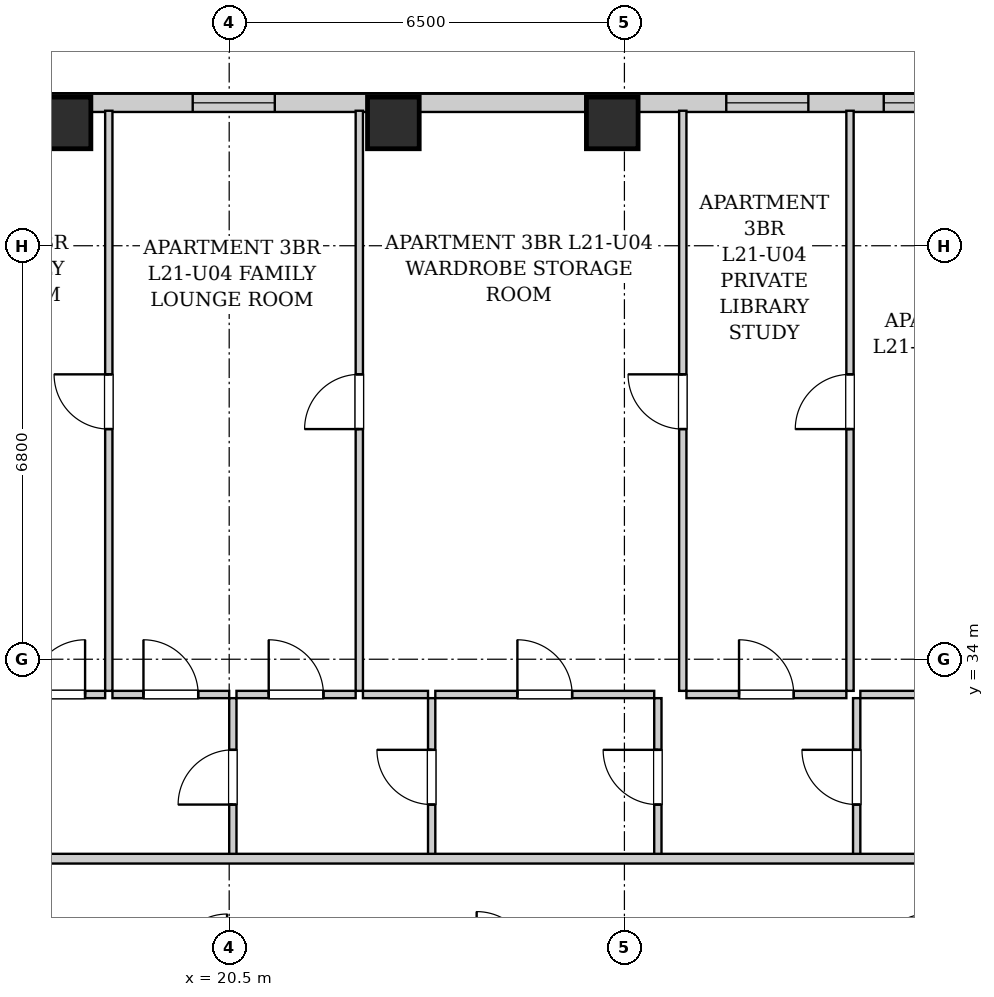
"""IFC4 building model, lengths in metres.
Left out: names, types, materials, properties, quantities, classifications, styles, units other than length and angle.
Written with IfcOpenShell. Run it as: python <this file> out.ifc"""

import sys

from ifc_helpers import new_model, si_unit, direction, frame, frame_2d, origin, origin_2d, place, context, subcontext, project, spatial, rectangle, extrude, element, fill, save


model = new_model("IFC4")
c1 = context("Model", 3, precision=1e-05, world=origin(), true_north=direction((0.0, 1.0)))
c2 = subcontext(c1, "Body", "Model", "MODEL_VIEW")
j1 = project(units=[si_unit("LENGTHUNIT", "METRE"), si_unit("PLANEANGLEUNIT", "RADIAN")], contexts=[c1])
p1 = place(None, origin())
s1 = spatial("IfcSite", under=j1, at=p1, CompositionType="ELEMENT")
p2 = place(p1, origin())
s2 = spatial("IfcBuilding", under=s1, at=p2, CompositionType="ELEMENT")
p3 = place(p2, frame((0.0, 0.0, 78.3)))
s3 = spatial("IfcBuildingStorey", under=s2, at=p3, CompositionType="ELEMENT", Elevation=78.3)
for number, where, z_axis, x_axis in (
    (1, (17.8, 42.82, 0.0), (0.0, 0.0, 1.0), (1.0, 0.0, 0.0)),
    (2, (23.2, 42.82, 0.0), (0.0, 0.0, 1.0), (1.0, 0.0, 0.0)),
    (3, (26.8, 42.82, 0.0), (0.0, 0.0, 1.0), (1.0, 0.0, 0.0)),
):
    element("IfcColumn", number, at=place(p3, frame(where, z_axis=z_axis, x_axis=x_axis)), inside=s3, PredefinedType="COLUMN", context=c2, shape_type="SweptSolid", body=[
        extrude(rectangle(XDim=0.85, YDim=0.85, at=origin_2d()), origin(), (0.0, 0.0, 1.0), 3.2),
    ])
p4 = place(p3, frame((10.0, 43.15, 0.0), z_axis=(0.0, 0.0, 1.0), x_axis=(1.0, 0.0, 0.0)))
e4 = element("IfcWall", 4, at=p4, inside=s3, PredefinedType="SOLIDWALL", context=c2, shape_type="SweptSolid", body=[
    extrude(rectangle(XDim=23.7, YDim=0.3, at=frame_2d((11.85, 0.0))), origin(), (0.0, 0.0, 1.0), 2.94),
])
p5 = place(p4, frame((5.625, 0.0, 0.55)))
e5 = element("IfcOpeningElement", 5, at=p5, cuts=e4, PredefinedType="OPENING", context=c2, shape_type="SweptSolid", body=[
    extrude(rectangle(XDim=1.35, YDim=1.2, at=frame_2d((0.675, 0.6))), frame((0.0, 0.16, 0.0), z_axis=(0.0, -1.0, 0.0), x_axis=(1.0, 0.0, 0.0)), (0.0, 0.0, 1.0), 0.32),
])
p6 = place(p4, frame((9.9, 0.0, 0.55)))
e6 = element("IfcOpeningElement", 6, at=p6, cuts=e4, PredefinedType="OPENING", context=c2, shape_type="SweptSolid", body=[
    extrude(rectangle(XDim=1.35, YDim=1.2, at=frame_2d((0.675, 0.6))), frame((0.0, 0.16, 0.0), z_axis=(0.0, -1.0, 0.0), x_axis=(1.0, 0.0, 0.0)), (0.0, 0.0, 1.0), 0.32),
])
p7 = place(p4, frame((18.675, 0.0, 0.55)))
e7 = element("IfcOpeningElement", 7, at=p7, cuts=e4, PredefinedType="OPENING", context=c2, shape_type="SweptSolid", body=[
    extrude(rectangle(XDim=1.35, YDim=1.2, at=frame_2d((0.675, 0.6))), frame((0.0, 0.16, 0.0), z_axis=(0.0, -1.0, 0.0), x_axis=(1.0, 0.0, 0.0)), (0.0, 0.0, 1.0), 0.32),
])
p8 = place(p4, frame((21.265, 0.0, 0.55)))
e8 = element("IfcOpeningElement", 8, at=p8, cuts=e4, PredefinedType="OPENING", context=c2, shape_type="SweptSolid", body=[
    extrude(rectangle(XDim=1.35, YDim=1.2, at=frame_2d((0.675, 0.6))), frame((0.0, 0.16, 0.0), z_axis=(0.0, -1.0, 0.0), x_axis=(1.0, 0.0, 0.0)), (0.0, 0.0, 1.0), 0.32),
])
p9 = place(p3, frame((20.56, 30.76, 0.0), z_axis=(0.0, 0.0, 1.0), x_axis=(0.0, 1.0, 0.0)))
e9 = element("IfcWall", 9, at=p9, inside=s3, PredefinedType="PARTITIONING", context=c2, shape_type="SweptSolid", body=[
    extrude(rectangle(XDim=2.6, YDim=0.12, at=frame_2d((1.3, 0.0))), origin(), (0.0, 0.0, 1.0), 2.94),
])
p10 = place(p9, frame((0.85, 0.0, 0.0)))
e10 = element("IfcOpeningElement", 10, at=p10, cuts=e9, PredefinedType="OPENING", context=c2, shape_type="SweptSolid", body=[
    extrude(rectangle(XDim=0.9, YDim=2.05, at=frame_2d((0.45, 1.025))), frame((0.0, 0.07, 0.0), z_axis=(0.0, -1.0, 0.0), x_axis=(1.0, 0.0, 0.0)), (0.0, 0.0, 1.0), 0.14),
])
p11 = place(p3, frame((16.9, 33.42, 0.0), z_axis=(0.0, 0.0, 1.0), x_axis=(1.0, 0.0, 0.0)))
e11 = element("IfcWall", 11, at=p11, inside=s3, PredefinedType="PARTITIONING", context=c2, shape_type="SweptSolid", body=[
    extrude(rectangle(XDim=1.56, YDim=0.12, at=frame_2d((0.78, 0.0))), origin(), (0.0, 0.0, 1.0), 2.94),
])
p12 = place(p11, frame((0.33, 0.0, 0.0)))
e12 = element("IfcOpeningElement", 12, at=p12, cuts=e11, PredefinedType="OPENING", context=c2, shape_type="SweptSolid", body=[
    extrude(rectangle(XDim=0.9, YDim=2.05, at=frame_2d((0.45, 1.025))), frame((0.0, 0.07, 0.0), z_axis=(0.0, -1.0, 0.0), x_axis=(1.0, 0.0, 0.0)), (0.0, 0.0, 1.0), 0.14),
])
p13 = place(p3, frame((18.58, 33.42, 0.0), z_axis=(0.0, 0.0, 1.0), x_axis=(1.0, 0.0, 0.0)))
e13 = element("IfcWall", 13, at=p13, inside=s3, PredefinedType="PARTITIONING", context=c2, shape_type="SweptSolid", body=[
    extrude(rectangle(XDim=1.92, YDim=0.12, at=frame_2d((0.96, 0.0))), origin(), (0.0, 0.0, 1.0), 2.94),
])
p14 = place(p13, frame((0.51, 0.0, 0.0)))
e14 = element("IfcOpeningElement", 14, at=p14, cuts=e13, PredefinedType="OPENING", context=c2, shape_type="SweptSolid", body=[
    extrude(rectangle(XDim=0.9, YDim=2.05, at=frame_2d((0.45, 1.025))), frame((0.0, 0.07, 0.0), z_axis=(0.0, -1.0, 0.0), x_axis=(1.0, 0.0, 0.0)), (0.0, 0.0, 1.0), 0.14),
])
p15 = place(p3, frame((23.83, 30.76, 0.0), z_axis=(0.0, 0.0, 1.0), x_axis=(0.0, 1.0, 0.0)))
e15 = element("IfcWall", 15, at=p15, inside=s3, PredefinedType="PARTITIONING", context=c2, shape_type="SweptSolid", body=[
    extrude(rectangle(XDim=2.6, YDim=0.12, at=frame_2d((1.3, 0.0))), origin(), (0.0, 0.0, 1.0), 2.94),
])
p16 = place(p15, frame((0.85, 0.0, 0.0)))
e16 = element("IfcOpeningElement", 16, at=p16, cuts=e15, PredefinedType="OPENING", context=c2, shape_type="SweptSolid", body=[
    extrude(rectangle(XDim=0.9, YDim=2.05, at=frame_2d((0.45, 1.025))), frame((0.0, 0.07, 0.0), z_axis=(0.0, -1.0, 0.0), x_axis=(1.0, 0.0, 0.0)), (0.0, 0.0, 1.0), 0.14),
])
p17 = place(p3, frame((20.62, 33.42, 0.0), z_axis=(0.0, 0.0, 1.0), x_axis=(1.0, 0.0, 0.0)))
e17 = element("IfcWall", 17, at=p17, inside=s3, PredefinedType="PARTITIONING", context=c2, shape_type="SweptSolid", body=[
    extrude(rectangle(XDim=1.96, YDim=0.12, at=frame_2d((0.98, 0.0))), origin(), (0.0, 0.0, 1.0), 2.94),
])
p18 = place(p17, frame((0.53, 0.0, 0.0)))
e18 = element("IfcOpeningElement", 18, at=p18, cuts=e17, PredefinedType="OPENING", context=c2, shape_type="SweptSolid", body=[
    extrude(rectangle(XDim=0.9, YDim=2.05, at=frame_2d((0.45, 1.025))), frame((0.0, 0.07, 0.0), z_axis=(0.0, -1.0, 0.0), x_axis=(1.0, 0.0, 0.0)), (0.0, 0.0, 1.0), 0.14),
])
p19 = place(p3, frame((22.7, 33.42, 0.0), z_axis=(0.0, 0.0, 1.0), x_axis=(1.0, 0.0, 0.0)))
e19 = element("IfcWall", 19, at=p19, inside=s3, PredefinedType="PARTITIONING", context=c2, shape_type="SweptSolid", body=[
    extrude(rectangle(XDim=1.07, YDim=0.12, at=frame_2d((0.535, 0.0))), origin(), (0.0, 0.0, 1.0), 2.94),
])
p20 = place(p3, frame((27.55, 30.76, 0.0), z_axis=(0.0, 0.0, 1.0), x_axis=(0.0, 1.0, 0.0)))
e20 = element("IfcWall", 20, at=p20, inside=s3, PredefinedType="PARTITIONING", context=c2, shape_type="SweptSolid", body=[
    extrude(rectangle(XDim=2.6, YDim=0.12, at=frame_2d((1.3, 0.0))), origin(), (0.0, 0.0, 1.0), 2.94),
])
p21 = place(p20, frame((0.85, 0.0, 0.0)))
e21 = element("IfcOpeningElement", 21, at=p21, cuts=e20, PredefinedType="OPENING", context=c2, shape_type="SweptSolid", body=[
    extrude(rectangle(XDim=0.9, YDim=2.05, at=frame_2d((0.45, 1.025))), frame((0.0, 0.07, 0.0), z_axis=(0.0, -1.0, 0.0), x_axis=(1.0, 0.0, 0.0)), (0.0, 0.0, 1.0), 0.14),
])
p22 = place(p3, frame((23.89, 33.42, 0.0), z_axis=(0.0, 0.0, 1.0), x_axis=(1.0, 0.0, 0.0)))
e22 = element("IfcWall", 22, at=p22, inside=s3, PredefinedType="PARTITIONING", context=c2, shape_type="SweptSolid", body=[
    extrude(rectangle(XDim=3.6, YDim=0.12, at=frame_2d((1.8, 0.0))), origin(), (0.0, 0.0, 1.0), 2.94),
])
p23 = place(p22, frame((1.35, 0.0, 0.0)))
e23 = element("IfcOpeningElement", 23, at=p23, cuts=e22, PredefinedType="OPENING", context=c2, shape_type="SweptSolid", body=[
    extrude(rectangle(XDim=0.9, YDim=2.05, at=frame_2d((0.45, 1.025))), frame((0.0, 0.07, 0.0), z_axis=(0.0, -1.0, 0.0), x_axis=(1.0, 0.0, 0.0)), (0.0, 0.0, 1.0), 0.14),
])
p24 = place(p3, frame((30.82, 30.76, 0.0), z_axis=(0.0, 0.0, 1.0), x_axis=(0.0, 1.0, 0.0)))
e24 = element("IfcWall", 24, at=p24, inside=s3, PredefinedType="PARTITIONING", context=c2, shape_type="SweptSolid", body=[
    extrude(rectangle(XDim=2.6, YDim=0.12, at=frame_2d((1.3, 0.0))), origin(), (0.0, 0.0, 1.0), 2.94),
])
p25 = place(p24, frame((0.85, 0.0, 0.0)))
e25 = element("IfcOpeningElement", 25, at=p25, cuts=e24, PredefinedType="OPENING", context=c2, shape_type="SweptSolid", body=[
    extrude(rectangle(XDim=0.9, YDim=2.05, at=frame_2d((0.45, 1.025))), frame((0.0, 0.07, 0.0), z_axis=(0.0, -1.0, 0.0), x_axis=(1.0, 0.0, 0.0)), (0.0, 0.0, 1.0), 0.14),
])
p26 = place(p3, frame((28.02, 33.42, 0.0), z_axis=(0.0, 0.0, 1.0), x_axis=(1.0, 0.0, 0.0)))
e26 = element("IfcWall", 26, at=p26, inside=s3, PredefinedType="PARTITIONING", context=c2, shape_type="SweptSolid", body=[
    extrude(rectangle(XDim=2.63, YDim=0.12, at=frame_2d((1.315, 0.0))), origin(), (0.0, 0.0, 1.0), 2.94),
])
p27 = place(p26, frame((0.865, 0.0, 0.0)))
e27 = element("IfcOpeningElement", 27, at=p27, cuts=e26, PredefinedType="OPENING", context=c2, shape_type="SweptSolid", body=[
    extrude(rectangle(XDim=0.9, YDim=2.05, at=frame_2d((0.45, 1.025))), frame((0.0, 0.07, 0.0), z_axis=(0.0, -1.0, 0.0), x_axis=(1.0, 0.0, 0.0)), (0.0, 0.0, 1.0), 0.14),
])
p28 = place(p3, frame((30.88, 33.42, 0.0), z_axis=(0.0, 0.0, 1.0), x_axis=(1.0, 0.0, 0.0)))
e28 = element("IfcWall", 28, at=p28, inside=s3, PredefinedType="PARTITIONING", context=c2, shape_type="SweptSolid", body=[
    extrude(rectangle(XDim=3.6, YDim=0.12, at=frame_2d((1.8, 0.0))), origin(), (0.0, 0.0, 1.0), 2.94),
])
p29 = place(p28, frame((1.35, 0.0, 0.0)))
e29 = element("IfcOpeningElement", 29, at=p29, cuts=e28, PredefinedType="OPENING", context=c2, shape_type="SweptSolid", body=[
    extrude(rectangle(XDim=0.9, YDim=2.05, at=frame_2d((0.45, 1.025))), frame((0.0, 0.07, 0.0), z_axis=(0.0, -1.0, 0.0), x_axis=(1.0, 0.0, 0.0)), (0.0, 0.0, 1.0), 0.14),
])
p30 = place(p3, frame((18.52, 33.48, 0.0), z_axis=(0.0, 0.0, 1.0), x_axis=(0.0, 1.0, 0.0)))
e30 = element("IfcWall", 30, at=p30, inside=s3, PredefinedType="PARTITIONING", context=c2, shape_type="SweptSolid", body=[
    extrude(rectangle(XDim=9.54, YDim=0.12, at=frame_2d((4.77, 0.0))), origin(), (0.0, 0.0, 1.0), 2.94),
])
p31 = place(p30, frame((4.305, 0.0, 0.0)))
e31 = element("IfcOpeningElement", 31, at=p31, cuts=e30, PredefinedType="OPENING", context=c2, shape_type="SweptSolid", body=[
    extrude(rectangle(XDim=0.9, YDim=2.05, at=frame_2d((0.45, 1.025))), frame((0.0, 0.07, 0.0), z_axis=(0.0, -1.0, 0.0), x_axis=(1.0, 0.0, 0.0)), (0.0, 0.0, 1.0), 0.14),
])
p32 = place(p3, frame((22.64, 33.48, 0.0), z_axis=(0.0, 0.0, 1.0), x_axis=(0.0, 1.0, 0.0)))
e32 = element("IfcWall", 32, at=p32, inside=s3, PredefinedType="PARTITIONING", context=c2, shape_type="SweptSolid", body=[
    extrude(rectangle(XDim=9.54, YDim=0.12, at=frame_2d((4.77, 0.0))), origin(), (0.0, 0.0, 1.0), 2.94),
])
p33 = place(p32, frame((4.305, 0.0, 0.0)))
e33 = element("IfcOpeningElement", 33, at=p33, cuts=e32, PredefinedType="OPENING", context=c2, shape_type="SweptSolid", body=[
    extrude(rectangle(XDim=0.9, YDim=2.05, at=frame_2d((0.45, 1.025))), frame((0.0, 0.07, 0.0), z_axis=(0.0, -1.0, 0.0), x_axis=(1.0, 0.0, 0.0)), (0.0, 0.0, 1.0), 0.14),
])
p34 = place(p3, frame((27.96, 33.48, 0.0), z_axis=(0.0, 0.0, 1.0), x_axis=(0.0, 1.0, 0.0)))
e34 = element("IfcWall", 34, at=p34, inside=s3, PredefinedType="PARTITIONING", context=c2, shape_type="SweptSolid", body=[
    extrude(rectangle(XDim=9.54, YDim=0.12, at=frame_2d((4.77, 0.0))), origin(), (0.0, 0.0, 1.0), 2.94),
])
p35 = place(p34, frame((4.305, 0.0, 0.0)))
e35 = element("IfcOpeningElement", 35, at=p35, cuts=e34, PredefinedType="OPENING", context=c2, shape_type="SweptSolid", body=[
    extrude(rectangle(XDim=0.9, YDim=2.05, at=frame_2d((0.45, 1.025))), frame((0.0, 0.07, 0.0), z_axis=(0.0, -1.0, 0.0), x_axis=(1.0, 0.0, 0.0)), (0.0, 0.0, 1.0), 0.14),
])
p36 = place(p3, frame((30.71, 33.48, 0.0), z_axis=(0.0, 0.0, 1.0), x_axis=(0.0, 1.0, 0.0)))
e36 = element("IfcWall", 36, at=p36, inside=s3, PredefinedType="PARTITIONING", context=c2, shape_type="SweptSolid", body=[
    extrude(rectangle(XDim=9.54, YDim=0.12, at=frame_2d((4.77, 0.0))), origin(), (0.0, 0.0, 1.0), 2.94),
])
p37 = place(p36, frame((4.305, 0.0, 0.0)))
e37 = element("IfcOpeningElement", 37, at=p37, cuts=e36, PredefinedType="OPENING", context=c2, shape_type="SweptSolid", body=[
    extrude(rectangle(XDim=0.9, YDim=2.05, at=frame_2d((0.45, 1.025))), frame((0.0, 0.07, 0.0), z_axis=(0.0, -1.0, 0.0), x_axis=(1.0, 0.0, 0.0)), (0.0, 0.0, 1.0), 0.14),
])
p38 = place(p3, frame((10.05, 30.72, 0.0), z_axis=(0.0, 0.0, 1.0), x_axis=(1.0, 0.0, 0.0)))
e38 = element("IfcWall", 38, at=p38, inside=s3, PredefinedType="PARTITIONING", context=c2, shape_type="SweptSolid", body=[
    extrude(rectangle(XDim=30.8, YDim=0.16, at=frame_2d((15.4, 0.0))), origin(), (0.0, 0.0, 1.0), 2.94),
])
p39 = place(p38, frame((4.165, 0.0, 0.0)))
e39 = element("IfcOpeningElement", 39, at=p39, cuts=e38, PredefinedType="OPENING", context=c2, shape_type="SweptSolid", body=[
    extrude(rectangle(XDim=0.95, YDim=2.1, at=frame_2d((0.475, 1.05))), frame((0.0, 0.09, 0.0), z_axis=(0.0, -1.0, 0.0), x_axis=(1.0, 0.0, 0.0)), (0.0, 0.0, 1.0), 0.18),
])
p40 = place(p10, origin())
e40 = element("IfcDoor", 40, at=p40, inside=s3, OperationType="SINGLE_SWING_LEFT", PredefinedType="DOOR", context=c2, shape_type="SweptSolid", body=[
    extrude(rectangle(XDim=0.9, YDim=2.05, at=frame_2d((0.45, 1.025))), frame((0.0, 0.025, 0.0), z_axis=(0.0, -1.0, 0.0), x_axis=(1.0, 0.0, 0.0)), (0.0, 0.0, 1.0), 0.05),
])
fill(e10, e40)
p41 = place(p12, origin())
e41 = element("IfcDoor", 41, at=p41, inside=s3, OperationType="SINGLE_SWING_RIGHT", PredefinedType="DOOR", context=c2, shape_type="SweptSolid", body=[
    extrude(rectangle(XDim=0.9, YDim=2.05, at=frame_2d((0.45, 1.025))), frame((0.0, 0.025, 0.0), z_axis=(0.0, -1.0, 0.0), x_axis=(1.0, 0.0, 0.0)), (0.0, 0.0, 1.0), 0.05),
])
fill(e12, e41)
p42 = place(p14, origin())
e42 = element("IfcDoor", 42, at=p42, inside=s3, OperationType="SINGLE_SWING_LEFT", PredefinedType="DOOR", context=c2, shape_type="SweptSolid", body=[
    extrude(rectangle(XDim=0.9, YDim=2.05, at=frame_2d((0.45, 1.025))), frame((0.0, 0.025, 0.0), z_axis=(0.0, -1.0, 0.0), x_axis=(1.0, 0.0, 0.0)), (0.0, 0.0, 1.0), 0.05),
])
fill(e14, e42)
p43 = place(p16, origin())
e43 = element("IfcDoor", 43, at=p43, inside=s3, OperationType="SINGLE_SWING_RIGHT", PredefinedType="DOOR", context=c2, shape_type="SweptSolid", body=[
    extrude(rectangle(XDim=0.9, YDim=2.05, at=frame_2d((0.45, 1.025))), frame((0.0, 0.025, 0.0), z_axis=(0.0, -1.0, 0.0), x_axis=(1.0, 0.0, 0.0)), (0.0, 0.0, 1.0), 0.05),
])
fill(e16, e43)
p44 = place(p18, origin())
e44 = element("IfcDoor", 44, at=p44, inside=s3, OperationType="SINGLE_SWING_LEFT", PredefinedType="DOOR", context=c2, shape_type="SweptSolid", body=[
    extrude(rectangle(XDim=0.9, YDim=2.05, at=frame_2d((0.45, 1.025))), frame((0.0, 0.025, 0.0), z_axis=(0.0, -1.0, 0.0), x_axis=(1.0, 0.0, 0.0)), (0.0, 0.0, 1.0), 0.05),
])
fill(e18, e44)
p45 = place(p21, origin())
e45 = element("IfcDoor", 45, at=p45, inside=s3, OperationType="SINGLE_SWING_RIGHT", PredefinedType="DOOR", context=c2, shape_type="SweptSolid", body=[
    extrude(rectangle(XDim=0.9, YDim=2.05, at=frame_2d((0.45, 1.025))), frame((0.0, 0.025, 0.0), z_axis=(0.0, -1.0, 0.0), x_axis=(1.0, 0.0, 0.0)), (0.0, 0.0, 1.0), 0.05),
])
fill(e21, e45)
p46 = place(p23, origin())
e46 = element("IfcDoor", 46, at=p46, inside=s3, OperationType="SINGLE_SWING_LEFT", PredefinedType="DOOR", context=c2, shape_type="SweptSolid", body=[
    extrude(rectangle(XDim=0.9, YDim=2.05, at=frame_2d((0.45, 1.025))), frame((0.0, 0.025, 0.0), z_axis=(0.0, -1.0, 0.0), x_axis=(1.0, 0.0, 0.0)), (0.0, 0.0, 1.0), 0.05),
])
fill(e23, e46)
p47 = place(p25, origin())
e47 = element("IfcDoor", 47, at=p47, inside=s3, OperationType="SINGLE_SWING_RIGHT", PredefinedType="DOOR", context=c2, shape_type="SweptSolid", body=[
    extrude(rectangle(XDim=0.9, YDim=2.05, at=frame_2d((0.45, 1.025))), frame((0.0, 0.025, 0.0), z_axis=(0.0, -1.0, 0.0), x_axis=(1.0, 0.0, 0.0)), (0.0, 0.0, 1.0), 0.05),
])
fill(e25, e47)
p48 = place(p27, origin())
e48 = element("IfcDoor", 48, at=p48, inside=s3, OperationType="SINGLE_SWING_LEFT", PredefinedType="DOOR", context=c2, shape_type="SweptSolid", body=[
    extrude(rectangle(XDim=0.9, YDim=2.05, at=frame_2d((0.45, 1.025))), frame((0.0, 0.025, 0.0), z_axis=(0.0, -1.0, 0.0), x_axis=(1.0, 0.0, 0.0)), (0.0, 0.0, 1.0), 0.05),
])
fill(e27, e48)
p49 = place(p31, origin())
e49 = element("IfcDoor", 49, at=p49, inside=s3, OperationType="SINGLE_SWING_RIGHT", PredefinedType="DOOR", context=c2, shape_type="SweptSolid", body=[
    extrude(rectangle(XDim=0.9, YDim=2.05, at=frame_2d((0.45, 1.025))), frame((0.0, 0.025, 0.0), z_axis=(0.0, -1.0, 0.0), x_axis=(1.0, 0.0, 0.0)), (0.0, 0.0, 1.0), 0.05),
])
fill(e31, e49)
p50 = place(p33, origin())
e50 = element("IfcDoor", 50, at=p50, inside=s3, OperationType="SINGLE_SWING_LEFT", PredefinedType="DOOR", context=c2, shape_type="SweptSolid", body=[
    extrude(rectangle(XDim=0.9, YDim=2.05, at=frame_2d((0.45, 1.025))), frame((0.0, 0.025, 0.0), z_axis=(0.0, -1.0, 0.0), x_axis=(1.0, 0.0, 0.0)), (0.0, 0.0, 1.0), 0.05),
])
fill(e33, e50)
p51 = place(p35, origin())
e51 = element("IfcDoor", 51, at=p51, inside=s3, OperationType="SINGLE_SWING_RIGHT", PredefinedType="DOOR", context=c2, shape_type="SweptSolid", body=[
    extrude(rectangle(XDim=0.9, YDim=2.05, at=frame_2d((0.45, 1.025))), frame((0.0, 0.025, 0.0), z_axis=(0.0, -1.0, 0.0), x_axis=(1.0, 0.0, 0.0)), (0.0, 0.0, 1.0), 0.05),
])
fill(e35, e51)
p52 = place(p37, origin())
e52 = element("IfcDoor", 52, at=p52, inside=s3, OperationType="SINGLE_SWING_LEFT", PredefinedType="DOOR", context=c2, shape_type="SweptSolid", body=[
    extrude(rectangle(XDim=0.9, YDim=2.05, at=frame_2d((0.45, 1.025))), frame((0.0, 0.025, 0.0), z_axis=(0.0, -1.0, 0.0), x_axis=(1.0, 0.0, 0.0)), (0.0, 0.0, 1.0), 0.05),
])
fill(e37, e52)
p53 = place(p6, origin())
e53 = element("IfcWindow", 53, at=p53, inside=s3, PartitioningType="SINGLE_PANEL", PredefinedType="WINDOW", context=c2, shape_type="SweptSolid", body=[
    extrude(rectangle(XDim=1.35, YDim=1.2, at=frame_2d((0.675, 0.6))), frame((0.0, 0.03, 0.0), z_axis=(0.0, -1.0, 0.0), x_axis=(1.0, 0.0, 0.0)), (0.0, 0.0, 1.0), 0.06),
])
fill(e6, e53)
p54 = place(p7, origin())
e54 = element("IfcWindow", 54, at=p54, inside=s3, PartitioningType="SINGLE_PANEL", PredefinedType="WINDOW", context=c2, shape_type="SweptSolid", body=[
    extrude(rectangle(XDim=1.35, YDim=1.2, at=frame_2d((0.675, 0.6))), frame((0.0, 0.03, 0.0), z_axis=(0.0, -1.0, 0.0), x_axis=(1.0, 0.0, 0.0)), (0.0, 0.0, 1.0), 0.06),
])
fill(e7, e54)
p55 = place(p8, origin())
e55 = element("IfcWindow", 55, at=p55, inside=s3, PartitioningType="SINGLE_PANEL", PredefinedType="WINDOW", context=c2, shape_type="SweptSolid", body=[
    extrude(rectangle(XDim=1.35, YDim=1.2, at=frame_2d((0.675, 0.6))), frame((0.0, 0.03, 0.0), z_axis=(0.0, -1.0, 0.0), x_axis=(1.0, 0.0, 0.0)), (0.0, 0.0, 1.0), 0.06),
])
fill(e8, e55)
save(model, sys.argv[1])
